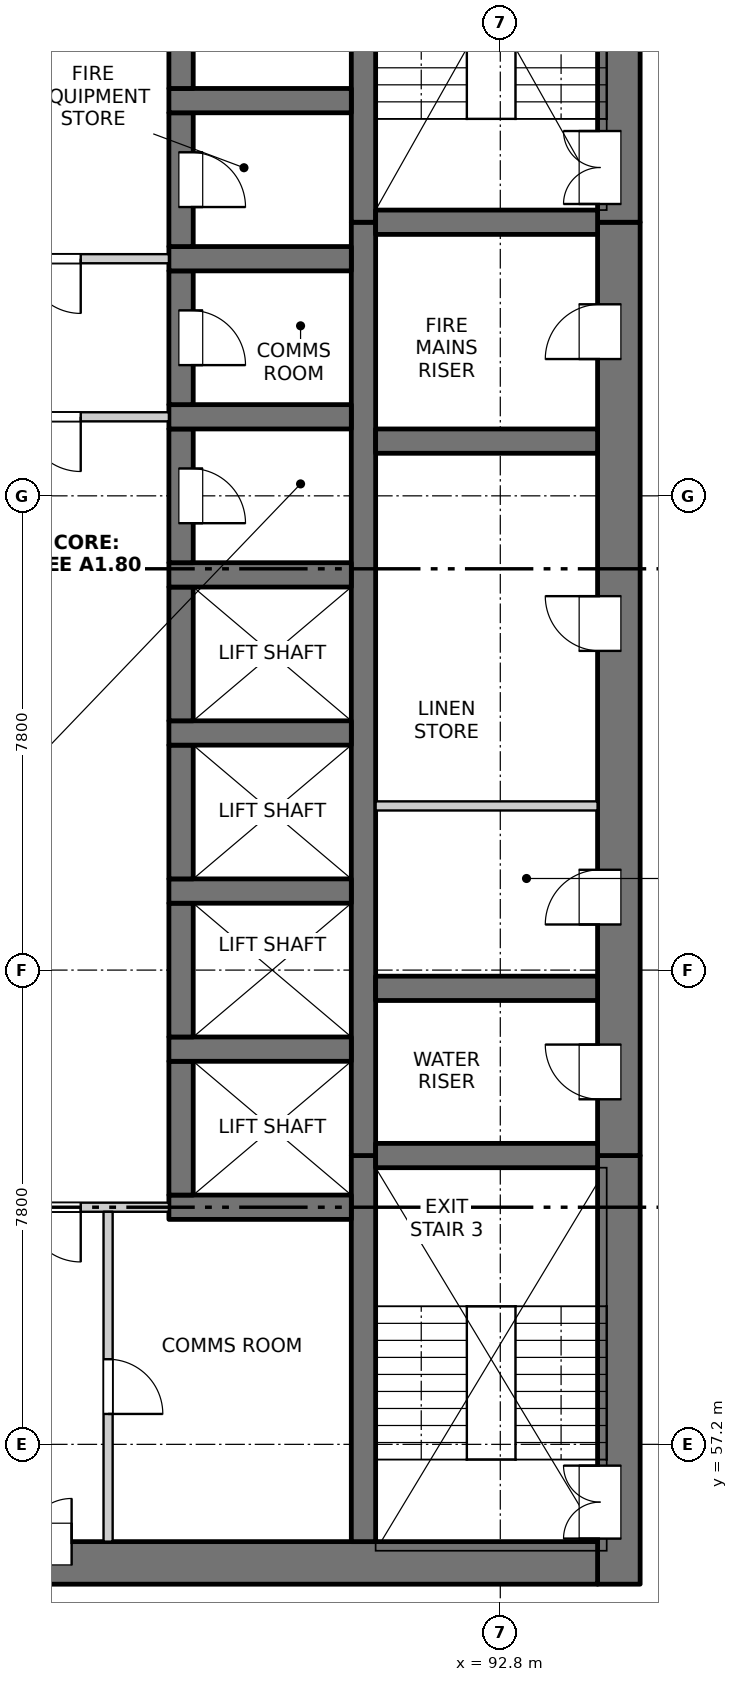
"""IFC4 building model, lengths in metres.
Left out: names, types, materials, properties, quantities, classifications, styles, units other than length and angle.
Written with IfcOpenShell. Run it as: python <this file> out.ifc"""

import sys

from ifc_helpers import new_model, si_unit, direction, frame, frame_2d, origin, place, context, subcontext, project, spatial, rectangle, extrude, element, fill, save


model = new_model("IFC4")
c1 = context("Model", 3, precision=1e-05, world=origin(), true_north=direction((0.0, 1.0)))
c2 = subcontext(c1, "Body", "Model", "MODEL_VIEW")
j1 = project(units=[si_unit("LENGTHUNIT", "METRE"), si_unit("PLANEANGLEUNIT", "RADIAN")], contexts=[c1])
p1 = place(None, origin())
s1 = spatial("IfcSite", under=j1, at=p1, CompositionType="ELEMENT")
p2 = place(p1, origin())
s2 = spatial("IfcBuilding", under=s1, at=p2, CompositionType="ELEMENT")
p3 = place(p2, frame((0.0, 0.0, 71.6)))
s3 = spatial("IfcBuildingStorey", under=s2, at=p3, CompositionType="ELEMENT", Elevation=71.6)
p4 = place(p3, frame((94.75, 54.9, -0.25), z_axis=(0.0, 0.0, 1.0), x_axis=(0.0, 1.0, 0.0)))
e1 = element("IfcWall", 1, at=p4, inside=s3, PredefinedType="SOLIDWALL", context=c2, shape_type="SweptSolid", body=[
    extrude(rectangle(XDim=7.05, YDim=0.7, at=frame_2d((3.525, 0.0))), origin(), (0.0, 0.0, 1.0), 3.4),
])
p5 = place(p4, frame((0.75, 0.0, 0.25)))
e2 = element("IfcOpeningElement", 2, at=p5, cuts=e1, PredefinedType="OPENING", context=c2, shape_type="SweptSolid", body=[
    extrude(rectangle(XDim=1.2, YDim=2.1, at=frame_2d((0.6, 1.05))), frame((0.0, 0.36, 0.0), z_axis=(0.0, -1.0, 0.0), x_axis=(1.0, 0.0, 0.0)), (0.0, 0.0, 1.0), 0.72),
])
p6 = place(p3, frame((94.75, 61.95, -0.25), z_axis=(0.0, 0.0, 1.0), x_axis=(0.0, 1.0, 0.0)))
e3 = element("IfcWall", 3, at=p6, inside=s3, PredefinedType="SOLIDWALL", context=c2, shape_type="SweptSolid", body=[
    extrude(rectangle(XDim=15.35, YDim=0.7, at=frame_2d((7.675, 0.0))), origin(), (0.0, 0.0, 1.0), 3.4),
])
p7 = place(p6, frame((0.925, 0.0, 0.25)))
e4 = element("IfcOpeningElement", 4, at=p7, cuts=e3, PredefinedType="OPENING", context=c2, shape_type="SweptSolid", body=[
    extrude(rectangle(XDim=0.9, YDim=2.1, at=frame_2d((0.45, 1.05))), frame((0.0, 0.36, 0.0), z_axis=(0.0, -1.0, 0.0), x_axis=(1.0, 0.0, 0.0)), (0.0, 0.0, 1.0), 0.72),
])
p8 = place(p6, frame((3.8, 0.0, 0.25)))
e5 = element("IfcOpeningElement", 5, at=p8, cuts=e3, PredefinedType="OPENING", context=c2, shape_type="SweptSolid", body=[
    extrude(rectangle(XDim=0.9, YDim=2.1, at=frame_2d((0.45, 1.05))), frame((0.0, 0.36, 0.0), z_axis=(0.0, -1.0, 0.0), x_axis=(1.0, 0.0, 0.0)), (0.0, 0.0, 1.0), 0.72),
])
p9 = place(p6, frame((8.3, 0.0, 0.25)))
e6 = element("IfcOpeningElement", 6, at=p9, cuts=e3, PredefinedType="OPENING", context=c2, shape_type="SweptSolid", body=[
    extrude(rectangle(XDim=0.9, YDim=2.1, at=frame_2d((0.45, 1.05))), frame((0.0, 0.36, 0.0), z_axis=(0.0, -1.0, 0.0), x_axis=(1.0, 0.0, 0.0)), (0.0, 0.0, 1.0), 0.72),
])
p10 = place(p6, frame((13.1, 0.0, 0.25)))
e7 = element("IfcOpeningElement", 7, at=p10, cuts=e3, PredefinedType="OPENING", context=c2, shape_type="SweptSolid", body=[
    extrude(rectangle(XDim=0.9, YDim=2.1, at=frame_2d((0.45, 1.05))), frame((0.0, 0.36, 0.0), z_axis=(0.0, -1.0, 0.0), x_axis=(1.0, 0.0, 0.0)), (0.0, 0.0, 1.0), 0.72),
])
p11 = place(p3, frame((94.75, 77.3, -0.25), z_axis=(0.0, 0.0, 1.0), x_axis=(0.0, 1.0, 0.0)))
e8 = element("IfcWall", 8, at=p11, inside=s3, PredefinedType="SOLIDWALL", context=c2, shape_type="SweptSolid", body=[
    extrude(rectangle(XDim=7.55, YDim=0.7, at=frame_2d((3.775, 0.0))), origin(), (0.0, 0.0, 1.0), 3.4),
])
p12 = place(p11, frame((0.3, 0.0, 0.25)))
e9 = element("IfcOpeningElement", 9, at=p12, cuts=e8, PredefinedType="OPENING", context=c2, shape_type="SweptSolid", body=[
    extrude(rectangle(XDim=1.2, YDim=2.1, at=frame_2d((0.6, 1.05))), frame((0.0, 0.36, 0.0), z_axis=(0.0, -1.0, 0.0), x_axis=(1.0, 0.0, 0.0)), (0.0, 0.0, 1.0), 0.72),
])
p13 = place(p3, frame((75.6, 55.25, -0.25), z_axis=(0.0, 0.0, 1.0), x_axis=(1.0, 0.0, 0.0)))
e10 = element("IfcWall", 10, at=p13, inside=s3, PredefinedType="SOLIDWALL", context=c2, shape_type="SweptSolid", body=[
    extrude(rectangle(XDim=18.8, YDim=0.7, at=frame_2d((9.4, 0.0))), origin(), (0.0, 0.0, 1.0), 3.4),
])
p14 = place(p13, frame((8.65, 0.0, 0.25)))
e11 = element("IfcOpeningElement", 11, at=p14, cuts=e10, PredefinedType="OPENING", context=c2, shape_type="SweptSolid", body=[
    extrude(rectangle(XDim=1.5, YDim=2.1, at=frame_2d((0.75, 1.05))), frame((0.0, 0.36, 0.0), z_axis=(0.0, -1.0, 0.0), x_axis=(1.0, 0.0, 0.0)), (0.0, 0.0, 1.0), 0.72),
])
p15 = place(p3, frame((90.55, 55.6, -0.25), z_axis=(0.0, 0.0, 1.0), x_axis=(0.0, 1.0, 0.0)))
e12 = element("IfcWall", 12, at=p15, inside=s3, PredefinedType="SOLIDWALL", context=c2, shape_type="SweptSolid", body=[
    extrude(rectangle(XDim=6.35, YDim=0.4, at=frame_2d((3.175, 0.0))), origin(), (0.0, 0.0, 1.0), 3.4),
])
p16 = place(p3, frame((90.55, 61.95, -0.25), z_axis=(0.0, 0.0, 1.0), x_axis=(0.0, 1.0, 0.0)))
e13 = element("IfcWall", 13, at=p16, inside=s3, PredefinedType="SOLIDWALL", context=c2, shape_type="SweptSolid", body=[
    extrude(rectangle(XDim=15.35, YDim=0.4, at=frame_2d((7.675, 0.0))), origin(), (0.0, 0.0, 1.0), 3.4),
])
p17 = place(p3, frame((90.55, 77.3, -0.25), z_axis=(0.0, 0.0, 1.0), x_axis=(0.0, 1.0, 0.0)))
e14 = element("IfcWall", 14, at=p17, inside=s3, PredefinedType="SOLIDWALL", context=c2, shape_type="SweptSolid", body=[
    extrude(rectangle(XDim=6.85, YDim=0.4, at=frame_2d((3.425, 0.0))), origin(), (0.0, 0.0, 1.0), 3.4),
])
p18 = place(p3, frame((87.35, 61.1, -0.25), z_axis=(0.0, 0.0, 1.0), x_axis=(1.0, 0.0, 0.0)))
e15 = element("IfcWall", 15, at=p18, inside=s3, PredefinedType="SOLIDWALL", context=c2, shape_type="SweptSolid", body=[
    extrude(rectangle(XDim=3.0, YDim=0.4, at=frame_2d((1.5, 0.0))), origin(), (0.0, 0.0, 1.0), 3.4),
])
p19 = place(p3, frame((87.55, 61.3, -0.25), z_axis=(0.0, 0.0, 1.0), x_axis=(0.0, 1.0, 0.0)))
e16 = element("IfcWall", 16, at=p19, inside=s3, PredefinedType="SOLIDWALL", context=c2, shape_type="SweptSolid", body=[
    extrude(rectangle(XDim=2.2, YDim=0.4, at=frame_2d((1.1, 0.0))), origin(), (0.0, 0.0, 1.0), 3.4),
])
p20 = place(p3, frame((87.35, 63.7, -0.25), z_axis=(0.0, 0.0, 1.0), x_axis=(1.0, 0.0, 0.0)))
e17 = element("IfcWall", 17, at=p20, inside=s3, PredefinedType="SOLIDWALL", context=c2, shape_type="SweptSolid", body=[
    extrude(rectangle(XDim=3.0, YDim=0.4, at=frame_2d((1.5, 0.0))), origin(), (0.0, 0.0, 1.0), 3.4),
])
p21 = place(p3, frame((87.55, 63.9, -0.25), z_axis=(0.0, 0.0, 1.0), x_axis=(0.0, 1.0, 0.0)))
e18 = element("IfcWall", 18, at=p21, inside=s3, PredefinedType="SOLIDWALL", context=c2, shape_type="SweptSolid", body=[
    extrude(rectangle(XDim=2.2, YDim=0.4, at=frame_2d((1.1, 0.0))), origin(), (0.0, 0.0, 1.0), 3.4),
])
p22 = place(p3, frame((87.35, 66.3, -0.25), z_axis=(0.0, 0.0, 1.0), x_axis=(1.0, 0.0, 0.0)))
e19 = element("IfcWall", 19, at=p22, inside=s3, PredefinedType="SOLIDWALL", context=c2, shape_type="SweptSolid", body=[
    extrude(rectangle(XDim=3.0, YDim=0.4, at=frame_2d((1.5, 0.0))), origin(), (0.0, 0.0, 1.0), 3.4),
])
p23 = place(p3, frame((87.55, 66.5, -0.25), z_axis=(0.0, 0.0, 1.0), x_axis=(0.0, 1.0, 0.0)))
e20 = element("IfcWall", 20, at=p23, inside=s3, PredefinedType="SOLIDWALL", context=c2, shape_type="SweptSolid", body=[
    extrude(rectangle(XDim=2.2, YDim=0.4, at=frame_2d((1.1, 0.0))), origin(), (0.0, 0.0, 1.0), 3.4),
])
p24 = place(p3, frame((87.35, 68.9, -0.25), z_axis=(0.0, 0.0, 1.0), x_axis=(1.0, 0.0, 0.0)))
e21 = element("IfcWall", 21, at=p24, inside=s3, PredefinedType="SOLIDWALL", context=c2, shape_type="SweptSolid", body=[
    extrude(rectangle(XDim=3.0, YDim=0.4, at=frame_2d((1.5, 0.0))), origin(), (0.0, 0.0, 1.0), 3.4),
])
p25 = place(p3, frame((87.55, 69.1, -0.25), z_axis=(0.0, 0.0, 1.0), x_axis=(0.0, 1.0, 0.0)))
e22 = element("IfcWall", 22, at=p25, inside=s3, PredefinedType="SOLIDWALL", context=c2, shape_type="SweptSolid", body=[
    extrude(rectangle(XDim=2.2, YDim=0.4, at=frame_2d((1.1, 0.0))), origin(), (0.0, 0.0, 1.0), 3.4),
])
p26 = place(p3, frame((87.35, 71.5, -0.25), z_axis=(0.0, 0.0, 1.0), x_axis=(1.0, 0.0, 0.0)))
e23 = element("IfcWall", 23, at=p26, inside=s3, PredefinedType="SOLIDWALL", context=c2, shape_type="SweptSolid", body=[
    extrude(rectangle(XDim=3.0, YDim=0.4, at=frame_2d((1.5, 0.0))), origin(), (0.0, 0.0, 1.0), 3.4),
])
p27 = place(p3, frame((87.55, 71.7, -0.25), z_axis=(0.0, 0.0, 1.0), x_axis=(0.0, 1.0, 0.0)))
e24 = element("IfcWall", 24, at=p27, inside=s3, PredefinedType="SOLIDWALL", context=c2, shape_type="SweptSolid", body=[
    extrude(rectangle(XDim=2.2, YDim=0.4, at=frame_2d((1.1, 0.0))), origin(), (0.0, 0.0, 1.0), 3.4),
])
p28 = place(p27, frame((0.65, 0.0, 0.25)))
e25 = element("IfcOpeningElement", 25, at=p28, cuts=e24, PredefinedType="OPENING", context=c2, shape_type="SweptSolid", body=[
    extrude(rectangle(XDim=0.9, YDim=2.1, at=frame_2d((0.45, 1.05))), frame((0.0, 0.21, 0.0), z_axis=(0.0, -1.0, 0.0), x_axis=(1.0, 0.0, 0.0)), (0.0, 0.0, 1.0), 0.42),
])
p29 = place(p3, frame((87.35, 74.1, -0.25), z_axis=(0.0, 0.0, 1.0), x_axis=(1.0, 0.0, 0.0)))
e26 = element("IfcWall", 26, at=p29, inside=s3, PredefinedType="SOLIDWALL", context=c2, shape_type="SweptSolid", body=[
    extrude(rectangle(XDim=3.0, YDim=0.4, at=frame_2d((1.5, 0.0))), origin(), (0.0, 0.0, 1.0), 3.4),
])
p30 = place(p3, frame((87.55, 74.3, -0.25), z_axis=(0.0, 0.0, 1.0), x_axis=(0.0, 1.0, 0.0)))
e27 = element("IfcWall", 27, at=p30, inside=s3, PredefinedType="SOLIDWALL", context=c2, shape_type="SweptSolid", body=[
    extrude(rectangle(XDim=2.2, YDim=0.4, at=frame_2d((1.1, 0.0))), origin(), (0.0, 0.0, 1.0), 3.4),
])
p31 = place(p30, frame((0.65, 0.0, 0.25)))
e28 = element("IfcOpeningElement", 28, at=p31, cuts=e27, PredefinedType="OPENING", context=c2, shape_type="SweptSolid", body=[
    extrude(rectangle(XDim=0.9, YDim=2.1, at=frame_2d((0.45, 1.05))), frame((0.0, 0.21, 0.0), z_axis=(0.0, -1.0, 0.0), x_axis=(1.0, 0.0, 0.0)), (0.0, 0.0, 1.0), 0.42),
])
p32 = place(p3, frame((87.35, 76.7, -0.25), z_axis=(0.0, 0.0, 1.0), x_axis=(1.0, 0.0, 0.0)))
e29 = element("IfcWall", 29, at=p32, inside=s3, PredefinedType="SOLIDWALL", context=c2, shape_type="SweptSolid", body=[
    extrude(rectangle(XDim=3.0, YDim=0.4, at=frame_2d((1.5, 0.0))), origin(), (0.0, 0.0, 1.0), 3.4),
])
p33 = place(p3, frame((87.55, 76.9, -0.25), z_axis=(0.0, 0.0, 1.0), x_axis=(0.0, 1.0, 0.0)))
e30 = element("IfcWall", 30, at=p33, inside=s3, PredefinedType="SOLIDWALL", context=c2, shape_type="SweptSolid", body=[
    extrude(rectangle(XDim=2.2, YDim=0.4, at=frame_2d((1.1, 0.0))), origin(), (0.0, 0.0, 1.0), 3.4),
])
p34 = place(p33, frame((0.65, 0.0, 0.25)))
e31 = element("IfcOpeningElement", 31, at=p34, cuts=e30, PredefinedType="OPENING", context=c2, shape_type="SweptSolid", body=[
    extrude(rectangle(XDim=0.9, YDim=2.1, at=frame_2d((0.45, 1.05))), frame((0.0, 0.21, 0.0), z_axis=(0.0, -1.0, 0.0), x_axis=(1.0, 0.0, 0.0)), (0.0, 0.0, 1.0), 0.42),
])
p35 = place(p3, frame((87.35, 79.3, -0.25), z_axis=(0.0, 0.0, 1.0), x_axis=(1.0, 0.0, 0.0)))
e32 = element("IfcWall", 32, at=p35, inside=s3, PredefinedType="SOLIDWALL", context=c2, shape_type="SweptSolid", body=[
    extrude(rectangle(XDim=3.0, YDim=0.4, at=frame_2d((1.5, 0.0))), origin(), (0.0, 0.0, 1.0), 3.4),
])
p36 = place(p3, frame((87.55, 79.5, -0.25), z_axis=(0.0, 0.0, 1.0), x_axis=(0.0, 1.0, 0.0)))
e33 = element("IfcWall", 33, at=p36, inside=s3, PredefinedType="SOLIDWALL", context=c2, shape_type="SweptSolid", body=[
    extrude(rectangle(XDim=2.2, YDim=0.4, at=frame_2d((1.1, 0.0))), origin(), (0.0, 0.0, 1.0), 3.4),
])
p37 = place(p36, frame((0.65, 0.0, 0.25)))
e34 = element("IfcOpeningElement", 34, at=p37, cuts=e33, PredefinedType="OPENING", context=c2, shape_type="SweptSolid", body=[
    extrude(rectangle(XDim=0.9, YDim=2.1, at=frame_2d((0.45, 1.05))), frame((0.0, 0.21, 0.0), z_axis=(0.0, -1.0, 0.0), x_axis=(1.0, 0.0, 0.0)), (0.0, 0.0, 1.0), 0.42),
])
for number, where, z_axis, x_axis in (
    (35, (90.75, 61.95, -0.25), (0.0, 0.0, 1.0), (1.0, 0.0, 0.0)),
    (36, (90.75, 64.7, -0.25), (0.0, 0.0, 1.0), (1.0, 0.0, 0.0)),
    (37, (90.75, 73.7, -0.25), (0.0, 0.0, 1.0), (1.0, 0.0, 0.0)),
    (38, (90.75, 77.3, -0.25), (0.0, 0.0, 1.0), (1.0, 0.0, 0.0)),
):
    element("IfcWall", number, at=place(p3, frame(where, z_axis=z_axis, x_axis=x_axis)), inside=s3, PredefinedType="SOLIDWALL", context=c2, shape_type="SweptSolid", body=[
        extrude(rectangle(XDim=3.65, YDim=0.4, at=frame_2d((1.825, 0.0))), origin(), (0.0, 0.0, 1.0), 3.4),
    ])
p38 = place(p3, frame((82.65, 61.1, 0.0), z_axis=(0.0, 0.0, 1.0), x_axis=(1.0, 0.0, 0.0)))
e39 = element("IfcWall", 39, at=p38, inside=s3, PredefinedType="PARTITIONING", context=c2, shape_type="SweptSolid", body=[
    extrude(rectangle(XDim=4.7, YDim=0.15, at=frame_2d((2.35, 0.0))), origin(), (0.0, 0.0, 1.0), 3.15),
])
p39 = place(p38, frame((1.45, 0.0, 0.0)))
e40 = element("IfcOpeningElement", 40, at=p39, cuts=e39, PredefinedType="OPENING", context=c2, shape_type="SweptSolid", body=[
    extrude(rectangle(XDim=1.8, YDim=2.1, at=frame_2d((0.9, 1.05))), frame((0.0, 0.085, 0.0), z_axis=(0.0, -1.0, 0.0), x_axis=(1.0, 0.0, 0.0)), (0.0, 0.0, 1.0), 0.17),
])
p40 = place(p3, frame((90.75, 67.7, 0.0), z_axis=(0.0, 0.0, 1.0), x_axis=(1.0, 0.0, 0.0)))
e41 = element("IfcWall", 41, at=p40, inside=s3, PredefinedType="PARTITIONING", context=c2, shape_type="SweptSolid", body=[
    extrude(rectangle(XDim=3.65, YDim=0.15, at=frame_2d((1.825, 0.0))), origin(), (0.0, 0.0, 1.0), 3.15),
])
p41 = place(p3, frame((82.65, 74.1, 0.0), z_axis=(0.0, 0.0, 1.0), x_axis=(1.0, 0.0, 0.0)))
e42 = element("IfcWall", 42, at=p41, inside=s3, PredefinedType="PARTITIONING", context=c2, shape_type="SweptSolid", body=[
    extrude(rectangle(XDim=4.7, YDim=0.15, at=frame_2d((2.35, 0.0))), origin(), (0.0, 0.0, 1.0), 3.15),
])
p42 = place(p41, frame((1.45, 0.0, 0.0)))
e43 = element("IfcOpeningElement", 43, at=p42, cuts=e42, PredefinedType="OPENING", context=c2, shape_type="SweptSolid", body=[
    extrude(rectangle(XDim=1.8, YDim=2.1, at=frame_2d((0.9, 1.05))), frame((0.0, 0.085, 0.0), z_axis=(0.0, -1.0, 0.0), x_axis=(1.0, 0.0, 0.0)), (0.0, 0.0, 1.0), 0.17),
])
p43 = place(p3, frame((82.65, 76.7, 0.0), z_axis=(0.0, 0.0, 1.0), x_axis=(1.0, 0.0, 0.0)))
e44 = element("IfcWall", 44, at=p43, inside=s3, PredefinedType="PARTITIONING", context=c2, shape_type="SweptSolid", body=[
    extrude(rectangle(XDim=4.7, YDim=0.15, at=frame_2d((2.35, 0.0))), origin(), (0.0, 0.0, 1.0), 3.15),
])
p44 = place(p43, frame((1.45, 0.0, 0.0)))
e45 = element("IfcOpeningElement", 45, at=p44, cuts=e44, PredefinedType="OPENING", context=c2, shape_type="SweptSolid", body=[
    extrude(rectangle(XDim=1.8, YDim=2.1, at=frame_2d((0.9, 1.05))), frame((0.0, 0.085, 0.0), z_axis=(0.0, -1.0, 0.0), x_axis=(1.0, 0.0, 0.0)), (0.0, 0.0, 1.0), 0.17),
])
p45 = place(p3, frame((86.35, 55.6, 0.0), z_axis=(0.0, 0.0, 1.0), x_axis=(0.0, 1.0, 0.0)))
e46 = element("IfcWall", 46, at=p45, inside=s3, PredefinedType="PARTITIONING", context=c2, shape_type="SweptSolid", body=[
    extrude(rectangle(XDim=5.425, YDim=0.15, at=frame_2d((2.712, 0.0))), origin(), (0.0, 0.0, 1.0), 3.15),
])
p46 = place(p45, frame((2.1, 0.0, 0.0)))
e47 = element("IfcOpeningElement", 47, at=p46, cuts=e46, PredefinedType="OPENING", context=c2, shape_type="SweptSolid", body=[
    extrude(rectangle(XDim=0.9, YDim=2.1, at=frame_2d((0.45, 1.05))), frame((0.0, 0.085, 0.0), z_axis=(0.0, -1.0, 0.0), x_axis=(1.0, 0.0, 0.0)), (0.0, 0.0, 1.0), 0.17),
])
p47 = place(p14, origin())
e48 = element("IfcDoor", 48, at=p47, inside=s3, OperationType="DOUBLE_DOOR_SINGLE_SWING", PredefinedType="DOOR", context=c2, shape_type="SweptSolid", body=[
    extrude(rectangle(XDim=1.5, YDim=2.1, at=frame_2d((0.75, 1.05))), frame((0.0, 0.335, 0.0), z_axis=(0.0, -1.0, 0.0), x_axis=(1.0, 0.0, 0.0)), (0.0, 0.0, 1.0), 0.05),
])
fill(e11, e48)
p48 = place(p5, origin())
e49 = element("IfcDoor", 49, at=p48, inside=s3, OperationType="DOUBLE_DOOR_SINGLE_SWING", PredefinedType="DOOR", context=c2, shape_type="SweptSolid", body=[
    extrude(rectangle(XDim=1.2, YDim=2.1, at=frame_2d((0.6, 1.05))), frame((0.0, 0.335, 0.0), z_axis=(0.0, -1.0, 0.0), x_axis=(1.0, 0.0, 0.0)), (0.0, 0.0, 1.0), 0.05),
])
fill(e2, e49)
p49 = place(p46, origin())
e50 = element("IfcDoor", 50, at=p49, inside=s3, OperationType="SINGLE_SWING_RIGHT", PredefinedType="DOOR", context=c2, shape_type="SweptSolid", body=[
    extrude(rectangle(XDim=0.9, YDim=2.1, at=frame_2d((0.45, 1.05))), frame((0.0, 0.025, 0.0), z_axis=(0.0, -1.0, 0.0), x_axis=(1.0, 0.0, 0.0)), (0.0, 0.0, 1.0), 0.05),
])
fill(e47, e50)
p50 = place(p39, origin())
e51 = element("IfcDoor", 51, at=p50, inside=s3, OperationType="DOUBLE_DOOR_SINGLE_SWING", PredefinedType="DOOR", context=c2, shape_type="SweptSolid", body=[
    extrude(rectangle(XDim=1.8, YDim=2.1, at=frame_2d((0.9, 1.05))), frame((0.0, 0.025, 0.0), z_axis=(0.0, -1.0, 0.0), x_axis=(1.0, 0.0, 0.0)), (0.0, 0.0, 1.0), 0.05),
])
fill(e40, e51)
p51 = place(p7, origin())
e52 = element("IfcDoor", 52, at=p51, inside=s3, OperationType="SINGLE_SWING_RIGHT", PredefinedType="DOOR", context=c2, shape_type="SweptSolid", body=[
    extrude(rectangle(XDim=0.9, YDim=2.1, at=frame_2d((0.45, 1.05))), frame((0.0, 0.335, 0.0), z_axis=(0.0, -1.0, 0.0), x_axis=(1.0, 0.0, 0.0)), (0.0, 0.0, 1.0), 0.05),
])
fill(e4, e52)
p52 = place(p8, origin())
e53 = element("IfcDoor", 53, at=p52, inside=s3, OperationType="SINGLE_SWING_LEFT", PredefinedType="DOOR", context=c2, shape_type="SweptSolid", body=[
    extrude(rectangle(XDim=0.9, YDim=2.1, at=frame_2d((0.45, 1.05))), frame((0.0, 0.335, 0.0), z_axis=(0.0, -1.0, 0.0), x_axis=(1.0, 0.0, 0.0)), (0.0, 0.0, 1.0), 0.05),
])
fill(e5, e53)
p53 = place(p9, origin())
e54 = element("IfcDoor", 54, at=p53, inside=s3, OperationType="SINGLE_SWING_RIGHT", PredefinedType="DOOR", context=c2, shape_type="SweptSolid", body=[
    extrude(rectangle(XDim=0.9, YDim=2.1, at=frame_2d((0.45, 1.05))), frame((0.0, 0.335, 0.0), z_axis=(0.0, -1.0, 0.0), x_axis=(1.0, 0.0, 0.0)), (0.0, 0.0, 1.0), 0.05),
])
fill(e6, e54)
p54 = place(p28, origin())
e55 = element("IfcDoor", 55, at=p54, inside=s3, OperationType="SINGLE_SWING_RIGHT", PredefinedType="DOOR", context=c2, shape_type="SweptSolid", body=[
    extrude(rectangle(XDim=0.9, YDim=2.1, at=frame_2d((0.45, 1.05))), frame((0.0, -0.135, 0.0), z_axis=(0.0, -1.0, 0.0), x_axis=(1.0, 0.0, 0.0)), (0.0, 0.0, 1.0), 0.05),
])
fill(e25, e55)
p55 = place(p42, origin())
e56 = element("IfcDoor", 56, at=p55, inside=s3, OperationType="DOUBLE_DOOR_SINGLE_SWING", PredefinedType="DOOR", context=c2, shape_type="SweptSolid", body=[
    extrude(rectangle(XDim=1.8, YDim=2.1, at=frame_2d((0.9, 1.05))), frame((0.0, 0.025, 0.0), z_axis=(0.0, -1.0, 0.0), x_axis=(1.0, 0.0, 0.0)), (0.0, 0.0, 1.0), 0.05),
])
fill(e43, e56)
p56 = place(p31, origin())
e57 = element("IfcDoor", 57, at=p56, inside=s3, OperationType="SINGLE_SWING_RIGHT", PredefinedType="DOOR", context=c2, shape_type="SweptSolid", body=[
    extrude(rectangle(XDim=0.9, YDim=2.1, at=frame_2d((0.45, 1.05))), frame((0.0, -0.135, 0.0), z_axis=(0.0, -1.0, 0.0), x_axis=(1.0, 0.0, 0.0)), (0.0, 0.0, 1.0), 0.05),
])
fill(e28, e57)
p57 = place(p10, origin())
e58 = element("IfcDoor", 58, at=p57, inside=s3, OperationType="SINGLE_SWING_LEFT", PredefinedType="DOOR", context=c2, shape_type="SweptSolid", body=[
    extrude(rectangle(XDim=0.9, YDim=2.1, at=frame_2d((0.45, 1.05))), frame((0.0, 0.335, 0.0), z_axis=(0.0, -1.0, 0.0), x_axis=(1.0, 0.0, 0.0)), (0.0, 0.0, 1.0), 0.05),
])
fill(e7, e58)
p58 = place(p44, origin())
e59 = element("IfcDoor", 59, at=p58, inside=s3, OperationType="DOUBLE_DOOR_SINGLE_SWING", PredefinedType="DOOR", context=c2, shape_type="SweptSolid", body=[
    extrude(rectangle(XDim=1.8, YDim=2.1, at=frame_2d((0.9, 1.05))), frame((0.0, 0.025, 0.0), z_axis=(0.0, -1.0, 0.0), x_axis=(1.0, 0.0, 0.0)), (0.0, 0.0, 1.0), 0.05),
])
fill(e45, e59)
p59 = place(p34, origin())
e60 = element("IfcDoor", 60, at=p59, inside=s3, OperationType="SINGLE_SWING_RIGHT", PredefinedType="DOOR", context=c2, shape_type="SweptSolid", body=[
    extrude(rectangle(XDim=0.9, YDim=2.1, at=frame_2d((0.45, 1.05))), frame((0.0, -0.135, 0.0), z_axis=(0.0, -1.0, 0.0), x_axis=(1.0, 0.0, 0.0)), (0.0, 0.0, 1.0), 0.05),
])
fill(e31, e60)
p60 = place(p12, origin())
e61 = element("IfcDoor", 61, at=p60, inside=s3, OperationType="DOUBLE_DOOR_SINGLE_SWING", PredefinedType="DOOR", context=c2, shape_type="SweptSolid", body=[
    extrude(rectangle(XDim=1.2, YDim=2.1, at=frame_2d((0.6, 1.05))), frame((0.0, 0.335, 0.0), z_axis=(0.0, -1.0, 0.0), x_axis=(1.0, 0.0, 0.0)), (0.0, 0.0, 1.0), 0.05),
])
fill(e9, e61)
save(model, sys.argv[1])
